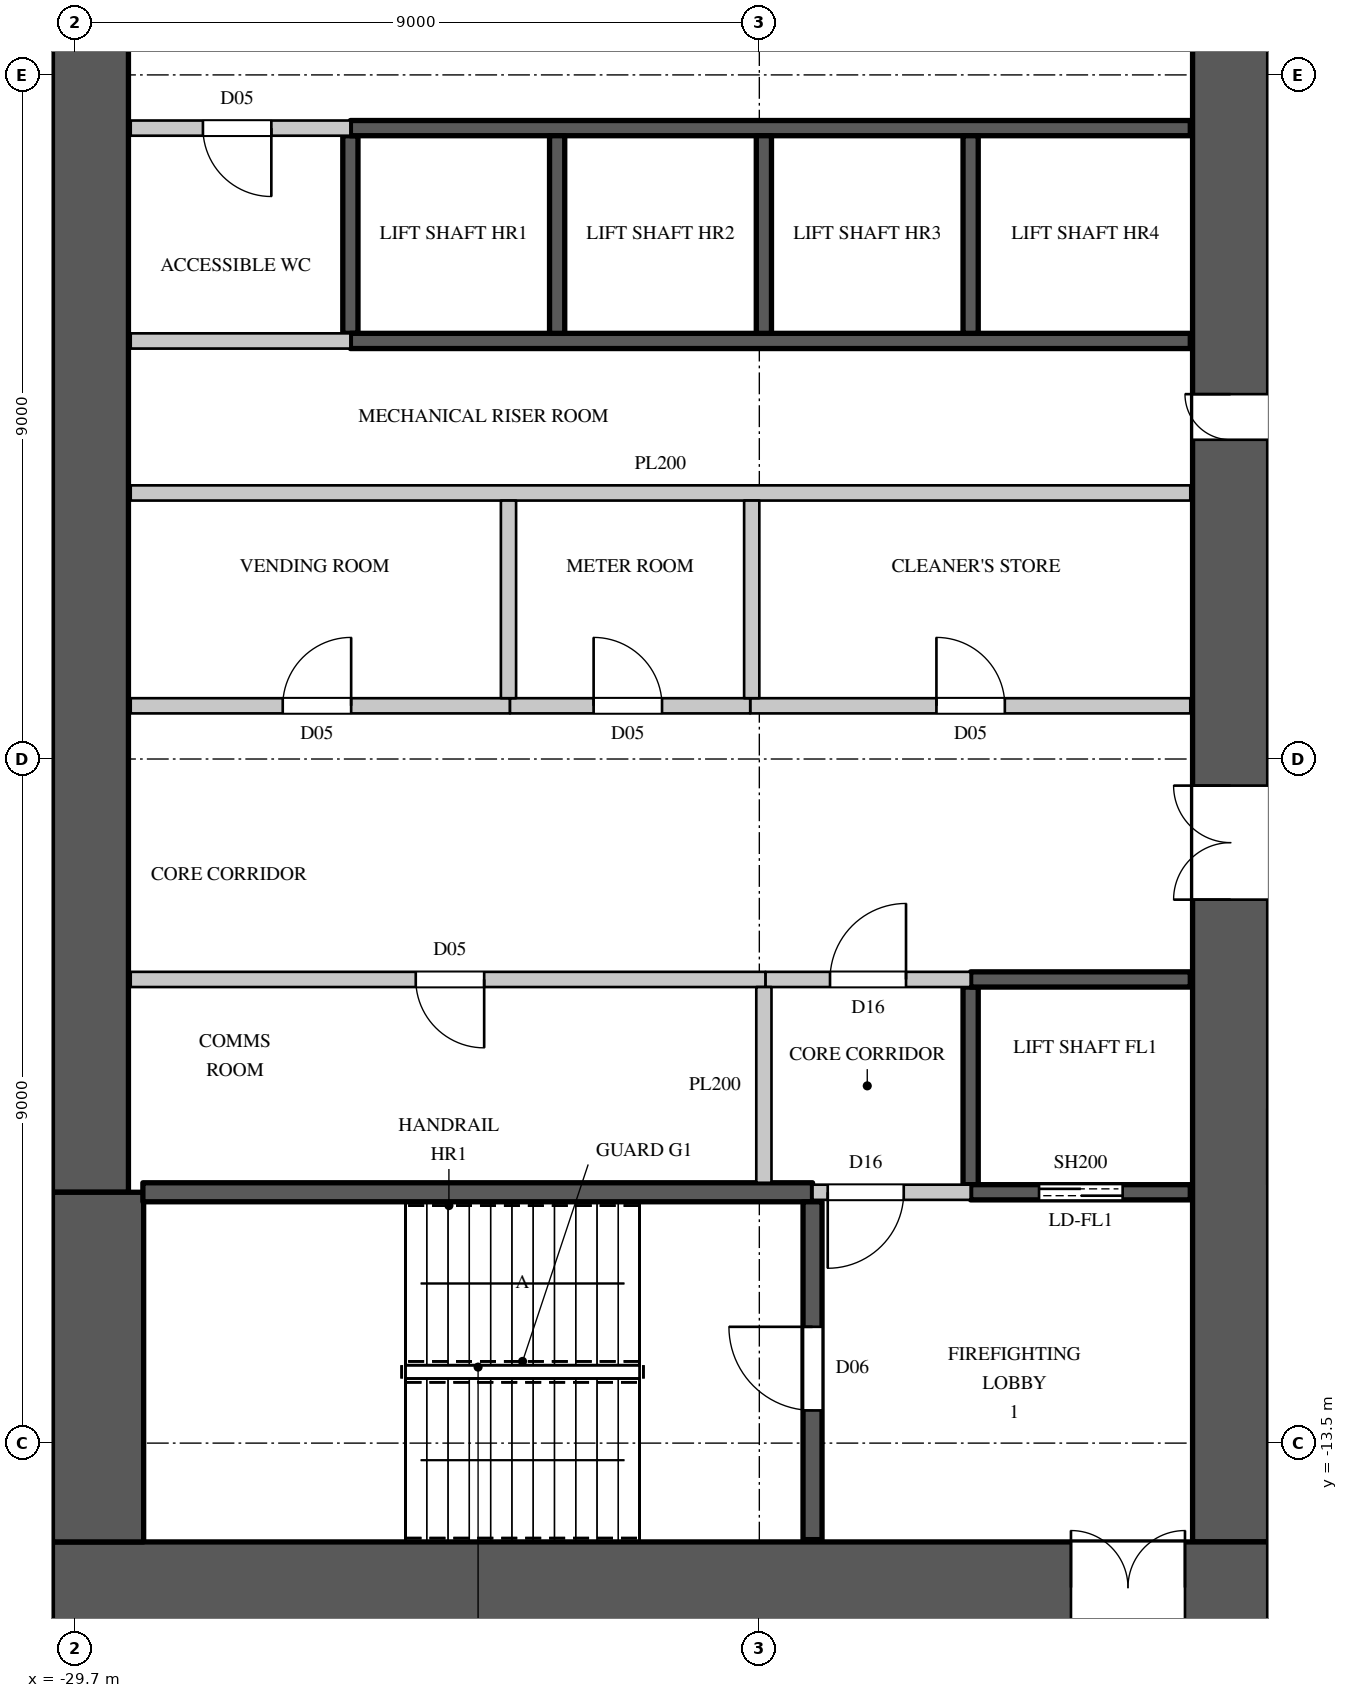
"""IFC4 building model, lengths in metres.
Left out: names, types, materials, properties, quantities, classifications, styles, units other than length and angle.
Written with IfcOpenShell. Run it as: python <this file> out.ifc"""

import sys

from ifc_helpers import new_model, si_unit, direction, frame, frame_2d, origin, place, context, subcontext, project, spatial, rectangle, extrude, element, fill, save


model = new_model("IFC4")
c1 = context("Model", 3, precision=1e-05, world=origin(), true_north=direction((0.0, 1.0)))
c2 = subcontext(c1, "Body", "Model", "MODEL_VIEW")
j1 = project(units=[si_unit("LENGTHUNIT", "METRE"), si_unit("PLANEANGLEUNIT", "RADIAN")], contexts=[c1])
p1 = place(None, origin())
s1 = spatial("IfcSite", under=j1, at=p1, CompositionType="ELEMENT")
p2 = place(p1, origin())
s2 = spatial("IfcBuilding", under=s1, at=p2, CompositionType="ELEMENT")
p3 = place(p2, frame((0.0, 0.0, 152.5)))
s3 = spatial("IfcBuildingStorey", under=s2, at=p3, CompositionType="ELEMENT", Elevation=152.5)
p4 = place(p3, frame((-30.0, -15.4, 0.0), z_axis=(0.0, 0.0, 1.0), x_axis=(1.0, 0.0, 0.0)))
e1 = element("IfcWall", 1, at=p4, inside=s3, PredefinedType="SHEAR", context=c2, shape_type="SweptSolid", body=[
    extrude(rectangle(XDim=16.0, YDim=1.2, at=frame_2d((8.0, 0.0))), origin(), (0.0, 0.0, 1.0), 8.0),
])
p5 = place(p4, frame((13.4, 0.0, 0.0)))
e2 = element("IfcOpeningElement", 2, at=p5, cuts=e1, PredefinedType="OPENING", context=c2, shape_type="SweptSolid", body=[
    extrude(rectangle(XDim=1.5, YDim=2.4, at=frame_2d((0.75, 1.2))), frame((0.0, 0.61, 0.0), z_axis=(0.0, -1.0, 0.0), x_axis=(1.0, 0.0, 0.0)), (0.0, 0.0, 1.0), 1.22),
])
p6 = place(p3, frame((-14.5, -14.8, 0.0), z_axis=(0.0, 0.0, 1.0), x_axis=(0.0, 1.0, 0.0)))
e3 = element("IfcWall", 3, at=p6, inside=s3, PredefinedType="SHEAR", context=c2, shape_type="SweptSolid", body=[
    extrude(rectangle(XDim=29.6, YDim=1.0, at=frame_2d((14.8, 0.0))), origin(), (0.0, 0.0, 1.0), 8.0),
])
p7 = place(p6, frame((8.45, 0.0, 0.0)))
e4 = element("IfcOpeningElement", 4, at=p7, cuts=e3, PredefinedType="OPENING", context=c2, shape_type="SweptSolid", body=[
    extrude(rectangle(XDim=1.5, YDim=2.4, at=frame_2d((0.75, 1.2))), frame((0.0, 0.51, 0.0), z_axis=(0.0, -1.0, 0.0), x_axis=(1.0, 0.0, 0.0)), (0.0, 0.0, 1.0), 1.02),
])
p8 = place(p6, frame((19.65, 0.0, 0.0)))
e5 = element("IfcOpeningElement", 5, at=p8, cuts=e3, PredefinedType="OPENING", context=c2, shape_type="SweptSolid", body=[
    extrude(rectangle(XDim=1.5, YDim=2.4, at=frame_2d((0.75, 1.2))), frame((0.0, 0.51, 0.0), z_axis=(0.0, -1.0, 0.0), x_axis=(1.0, 0.0, 0.0)), (0.0, 0.0, 1.0), 1.02),
])
p9 = place(p6, frame((14.5, 0.0, 0.0)))
e6 = element("IfcOpeningElement", 6, at=p9, cuts=e3, PredefinedType="OPENING", context=c2, shape_type="SweptSolid", body=[
    extrude(rectangle(XDim=0.6, YDim=2.0, at=frame_2d((0.3, 1.0))), frame((0.0, 0.51, 0.0), z_axis=(0.0, -1.0, 0.0), x_axis=(1.0, 0.0, 0.0)), (0.0, 0.0, 1.0), 1.02),
])
p10 = place(p3, frame((-29.5, -10.2, 0.0), z_axis=(0.0, 0.0, 1.0), x_axis=(0.0, 1.0, 0.0)))
e7 = element("IfcWall", 7, at=p10, inside=s3, PredefinedType="SHEAR", context=c2, shape_type="SweptSolid", body=[
    extrude(rectangle(XDim=20.4, YDim=1.0, at=frame_2d((10.2, 0.0))), origin(), (0.0, 0.0, 1.0), 8.0),
])
p11 = place(p3, frame((-29.4, -14.8, 0.0), z_axis=(0.0, 0.0, 1.0), x_axis=(0.0, 1.0, 0.0)))
e8 = element("IfcWall", 8, at=p11, inside=s3, PredefinedType="SHEAR", context=c2, shape_type="SweptSolid", body=[
    extrude(rectangle(XDim=4.6, YDim=1.2, at=frame_2d((2.3, 0.0))), origin(), (0.0, 0.0, 1.0), 8.0),
])
p12 = place(p3, frame((-28.97, -3.8, 0.0), z_axis=(0.0, 0.0, 1.0), x_axis=(1.0, 0.0, 0.0)))
e9 = element("IfcWall", 9, at=p12, inside=s3, PredefinedType="PARTITIONING", context=c2, shape_type="SweptSolid", body=[
    extrude(rectangle(XDim=4.99, YDim=0.2, at=frame_2d((2.495, 0.0))), origin(), (0.0, 0.0, 1.0), 7.7),
])
p13 = place(p12, frame((2.0, 0.0, 0.0)))
e10 = element("IfcOpeningElement", 10, at=p13, cuts=e9, PredefinedType="OPENING", context=c2, shape_type="SweptSolid", body=[
    extrude(rectangle(XDim=0.9, YDim=2.2, at=frame_2d((0.45, 1.1))), frame((0.0, 0.11, 0.0), z_axis=(0.0, -1.0, 0.0), x_axis=(1.0, 0.0, 0.0)), (0.0, 0.0, 1.0), 0.22),
])
p14 = place(p3, frame((-28.97, 3.8, 0.0), z_axis=(0.0, 0.0, 1.0), x_axis=(1.0, 0.0, 0.0)))
e11 = element("IfcWall", 11, at=p14, inside=s3, PredefinedType="PARTITIONING", context=c2, shape_type="SweptSolid", body=[
    extrude(rectangle(XDim=2.89, YDim=0.2, at=frame_2d((1.445, 0.0))), origin(), (0.0, 0.0, 1.0), 7.7),
])
p15 = place(p14, frame((0.95, 0.0, 0.0)))
e12 = element("IfcOpeningElement", 12, at=p15, cuts=e11, PredefinedType="OPENING", context=c2, shape_type="SweptSolid", body=[
    extrude(rectangle(XDim=0.9, YDim=2.2, at=frame_2d((0.45, 1.1))), frame((0.0, 0.11, 0.0), z_axis=(0.0, -1.0, 0.0), x_axis=(1.0, 0.0, 0.0)), (0.0, 0.0, 1.0), 0.22),
])
p16 = place(p3, frame((-20.82, -3.8, 0.0), z_axis=(0.0, 0.0, 1.0), x_axis=(1.0, 0.0, 0.0)))
e13 = element("IfcWall", 13, at=p16, inside=s3, PredefinedType="PARTITIONING", context=c2, shape_type="SweptSolid", body=[
    extrude(rectangle(XDim=5.79, YDim=0.2, at=frame_2d((2.895, 0.0))), origin(), (0.0, 0.0, 1.0), 7.7),
])
p17 = place(p16, frame((2.45, 0.0, 0.0)))
e14 = element("IfcOpeningElement", 14, at=p17, cuts=e13, PredefinedType="OPENING", context=c2, shape_type="SweptSolid", body=[
    extrude(rectangle(XDim=0.9, YDim=2.2, at=frame_2d((0.45, 1.1))), frame((0.0, 0.11, 0.0), z_axis=(0.0, -1.0, 0.0), x_axis=(1.0, 0.0, 0.0)), (0.0, 0.0, 1.0), 0.22),
])
p18 = place(p3, frame((-20.62, -7.4, 0.0), z_axis=(0.0, 0.0, 1.0), x_axis=(1.0, 0.0, 0.0)))
e15 = element("IfcWall", 15, at=p18, inside=s3, PredefinedType="PARTITIONING", context=c2, shape_type="SweptSolid", body=[
    extrude(rectangle(XDim=2.7, YDim=0.2, at=frame_2d((1.35, 0.0))), origin(), (0.0, 0.0, 1.0), 7.7),
])
p19 = place(p18, frame((0.85, 0.0, 0.0)))
e16 = element("IfcOpeningElement", 16, at=p19, cuts=e15, PredefinedType="OPENING", context=c2, shape_type="SweptSolid", body=[
    extrude(rectangle(XDim=1.0, YDim=2.2, at=frame_2d((0.5, 1.1))), frame((0.0, 0.11, 0.0), z_axis=(0.0, -1.0, 0.0), x_axis=(1.0, 0.0, 0.0)), (0.0, 0.0, 1.0), 0.22),
])
p20 = place(p3, frame((-20.0, -10.2, 0.0), z_axis=(0.0, 0.0, 1.0), x_axis=(1.0, 0.0, 0.0)))
e17 = element("IfcWall", 17, at=p20, inside=s3, PredefinedType="PARTITIONING", context=c2, shape_type="SweptSolid", body=[
    extrude(rectangle(XDim=2.08, YDim=0.2, at=frame_2d((1.04, 0.0))), origin(), (0.0, 0.0, 1.0), 7.7),
])
p21 = place(p20, frame((0.2, 0.0, 0.0)))
e18 = element("IfcOpeningElement", 18, at=p21, cuts=e17, PredefinedType="OPENING", context=c2, shape_type="SweptSolid", body=[
    extrude(rectangle(XDim=1.0, YDim=2.2, at=frame_2d((0.5, 1.1))), frame((0.0, 0.11, 0.0), z_axis=(0.0, -1.0, 0.0), x_axis=(1.0, 0.0, 0.0)), (0.0, 0.0, 1.0), 0.22),
])
p22 = place(p3, frame((-28.97, -7.4, 0.0), z_axis=(0.0, 0.0, 1.0), x_axis=(1.0, 0.0, 0.0)))
e19 = element("IfcWall", 19, at=p22, inside=s3, PredefinedType="PARTITIONING", context=c2, shape_type="SweptSolid", body=[
    extrude(rectangle(XDim=8.35, YDim=0.2, at=frame_2d((4.175, 0.0))), origin(), (0.0, 0.0, 1.0), 7.7),
])
p23 = place(p22, frame((3.75, 0.0, 0.0)))
e20 = element("IfcOpeningElement", 20, at=p23, cuts=e19, PredefinedType="OPENING", context=c2, shape_type="SweptSolid", body=[
    extrude(rectangle(XDim=0.9, YDim=2.2, at=frame_2d((0.45, 1.1))), frame((0.0, 0.11, 0.0), z_axis=(0.0, -1.0, 0.0), x_axis=(1.0, 0.0, 0.0)), (0.0, 0.0, 1.0), 0.22),
])
p24 = place(p3, frame((-28.97, -1.0, 0.0), z_axis=(0.0, 0.0, 1.0), x_axis=(1.0, 0.0, 0.0)))
e21 = element("IfcWall", 21, at=p24, inside=s3, PredefinedType="PARTITIONING", context=c2, shape_type="SweptSolid", body=[
    extrude(rectangle(XDim=13.94, YDim=0.2, at=frame_2d((6.97, 0.0))), origin(), (0.0, 0.0, 1.0), 7.7),
])
p25 = place(p3, frame((-28.97, 1.0, 0.0), z_axis=(0.0, 0.0, 1.0), x_axis=(1.0, 0.0, 0.0)))
e22 = element("IfcWall", 22, at=p25, inside=s3, PredefinedType="PARTITIONING", context=c2, shape_type="SweptSolid", body=[
    extrude(rectangle(XDim=2.89, YDim=0.2, at=frame_2d((1.445, 0.0))), origin(), (0.0, 0.0, 1.0), 7.7),
])
p26 = place(p3, frame((-23.98, -3.8, 0.0), z_axis=(0.0, 0.0, 1.0), x_axis=(1.0, 0.0, 0.0)))
e23 = element("IfcWall", 23, at=p26, inside=s3, PredefinedType="PARTITIONING", context=c2, shape_type="SweptSolid", body=[
    extrude(rectangle(XDim=3.16, YDim=0.2, at=frame_2d((1.58, 0.0))), origin(), (0.0, 0.0, 1.0), 7.7),
])
p27 = place(p26, frame((1.1, 0.0, 0.0)))
e24 = element("IfcOpeningElement", 24, at=p27, cuts=e23, PredefinedType="OPENING", context=c2, shape_type="SweptSolid", body=[
    extrude(rectangle(XDim=0.9, YDim=2.2, at=frame_2d((0.45, 1.1))), frame((0.0, 0.11, 0.0), z_axis=(0.0, -1.0, 0.0), x_axis=(1.0, 0.0, 0.0)), (0.0, 0.0, 1.0), 0.22),
])
for number, where, z_axis, x_axis in (
    (25, (-24.0, -3.7, 0.0), (0.0, 0.0, 1.0), (0.0, 1.0, 0.0)),
    (26, (-20.8, -3.7, 0.0), (0.0, 0.0, 1.0), (0.0, 1.0, 0.0)),
):
    element("IfcWall", number, at=place(p3, frame(where, z_axis=z_axis, x_axis=x_axis)), inside=s3, PredefinedType="PARTITIONING", context=c2, shape_type="SweptSolid", body=[
        extrude(rectangle(XDim=2.6, YDim=0.2, at=frame_2d((1.3, 0.0))), origin(), (0.0, 0.0, 1.0), 7.7),
    ])
p28 = place(p3, frame((-20.64, -10.075, 0.0), z_axis=(0.0, 0.0, 1.0), x_axis=(0.0, 1.0, 0.0)))
e27 = element("IfcWall", 27, at=p28, inside=s3, PredefinedType="PARTITIONING", context=c2, shape_type="SweptSolid", body=[
    extrude(rectangle(XDim=2.575, YDim=0.2, at=frame_2d((1.288, 0.0))), origin(), (0.0, 0.0, 1.0), 7.7),
])
p29 = place(p3, frame((-26.08, 1.1, 0.0), z_axis=(0.0, 0.0, 1.0), x_axis=(0.0, 1.0, 0.0)))
e28 = element("IfcWall", 28, at=p29, inside=s3, PredefinedType="SHEAR", context=c2, shape_type="SweptSolid", body=[
    extrude(rectangle(XDim=2.6, YDim=0.2, at=frame_2d((1.3, 0.0))), origin(), (0.0, 0.0, 1.0), 7.7),
])
for number, where, z_axis, x_axis in (
    (29, (-26.08, 1.0, 0.0), (0.0, 0.0, 1.0), (1.0, 0.0, 0.0)),
    (30, (-26.08, 3.8, 0.0), (0.0, 0.0, 1.0), (1.0, 0.0, 0.0)),
):
    element("IfcWall", number, at=place(p3, frame(where, z_axis=z_axis, x_axis=x_axis)), inside=s3, PredefinedType="SHEAR", context=c2, shape_type="SweptSolid", body=[
        extrude(rectangle(XDim=11.05, YDim=0.2, at=frame_2d((5.525, 0.0))), origin(), (0.0, 0.0, 1.0), 7.7),
    ])
for number, where, z_axis, x_axis in (
    (31, (-23.36, 1.1, 0.0), (0.0, 0.0, 1.0), (0.0, 1.0, 0.0)),
    (32, (-20.64, 1.1, 0.0), (0.0, 0.0, 1.0), (0.0, 1.0, 0.0)),
):
    element("IfcWall", number, at=place(p3, frame(where, z_axis=z_axis, x_axis=x_axis)), inside=s3, PredefinedType="SHEAR", context=c2, shape_type="SweptSolid", body=[
        extrude(rectangle(XDim=2.6, YDim=0.2, at=frame_2d((1.3, 0.0))), origin(), (0.0, 0.0, 1.0), 8.0),
    ])
p30 = place(p3, frame((-17.92, -10.1, 0.0), z_axis=(0.0, 0.0, 1.0), x_axis=(0.0, 1.0, 0.0)))
e33 = element("IfcWall", 33, at=p30, inside=s3, PredefinedType="SHEAR", context=c2, shape_type="SweptSolid", body=[
    extrude(rectangle(XDim=2.6, YDim=0.2, at=frame_2d((1.3, 0.0))), origin(), (0.0, 0.0, 1.0), 7.7),
])
p31 = place(p3, frame((-17.92, -10.2, 0.0), z_axis=(0.0, 0.0, 1.0), x_axis=(1.0, 0.0, 0.0)))
e34 = element("IfcWall", 34, at=p31, inside=s3, PredefinedType="SHEAR", context=c2, shape_type="SweptSolid", body=[
    extrude(rectangle(XDim=2.89, YDim=0.2, at=frame_2d((1.445, 0.0))), origin(), (0.0, 0.0, 1.0), 7.7),
])
p32 = place(p31, frame((0.9, 0.0, 0.0)))
e35 = element("IfcOpeningElement", 35, at=p32, cuts=e34, PredefinedType="OPENING", context=c2, shape_type="SweptSolid", body=[
    extrude(rectangle(XDim=1.1, YDim=2.2, at=frame_2d((0.55, 1.1))), frame((0.0, 0.11, 0.0), z_axis=(0.0, -1.0, 0.0), x_axis=(1.0, 0.0, 0.0)), (0.0, 0.0, 1.0), 0.22),
])
p33 = place(p3, frame((-17.92, -7.4, 0.0), z_axis=(0.0, 0.0, 1.0), x_axis=(1.0, 0.0, 0.0)))
e36 = element("IfcWall", 36, at=p33, inside=s3, PredefinedType="SHEAR", context=c2, shape_type="SweptSolid", body=[
    extrude(rectangle(XDim=2.89, YDim=0.2, at=frame_2d((1.445, 0.0))), origin(), (0.0, 0.0, 1.0), 7.7),
])
p34 = place(p3, frame((-17.92, 1.1, 0.0), z_axis=(0.0, 0.0, 1.0), x_axis=(0.0, 1.0, 0.0)))
e37 = element("IfcWall", 37, at=p34, inside=s3, PredefinedType="SHEAR", context=c2, shape_type="SweptSolid", body=[
    extrude(rectangle(XDim=2.6, YDim=0.2, at=frame_2d((1.3, 0.0))), origin(), (0.0, 0.0, 1.0), 8.0),
])
p35 = place(p3, frame((-28.81, -10.2, 0.0), z_axis=(0.0, 0.0, 1.0), x_axis=(1.0, 0.0, 0.0)))
e38 = element("IfcWall", 38, at=p35, inside=s3, PredefinedType="SHEAR", context=c2, shape_type="SweptSolid", body=[
    extrude(rectangle(XDim=8.81, YDim=0.25, at=frame_2d((4.405, 0.0))), origin(), (0.0, 0.0, 1.0), 7.7),
])
p36 = place(p3, frame((-20.0, -14.77, 0.0), z_axis=(0.0, 0.0, 1.0), x_axis=(0.0, 1.0, 0.0)))
e39 = element("IfcWall", 39, at=p36, inside=s3, PredefinedType="SHEAR", context=c2, shape_type="SweptSolid", body=[
    extrude(rectangle(XDim=4.445, YDim=0.25, at=frame_2d((2.223, 0.0))), origin(), (0.0, 0.0, 1.0), 7.7),
])
p37 = place(p36, frame((1.7, 0.0, 0.0)))
e40 = element("IfcOpeningElement", 40, at=p37, cuts=e39, PredefinedType="OPENING", context=c2, shape_type="SweptSolid", body=[
    extrude(rectangle(XDim=1.1, YDim=2.2, at=frame_2d((0.55, 1.1))), frame((0.0, 0.135, 0.0), z_axis=(0.0, -1.0, 0.0), x_axis=(1.0, 0.0, 0.0)), (0.0, 0.0, 1.0), 0.27),
])
p38 = place(p37, origin())
e41 = element("IfcDoor", 41, at=p38, inside=s3, OperationType="SINGLE_SWING_RIGHT", PredefinedType="DOOR", context=c2, shape_type="SweptSolid", body=[
    extrude(rectangle(XDim=1.1, YDim=2.2, at=frame_2d((0.55, 1.1))), frame((0.0, 0.025, 0.0), z_axis=(0.0, -1.0, 0.0), x_axis=(1.0, 0.0, 0.0)), (0.0, 0.0, 1.0), 0.05),
])
fill(e40, e41)
p39 = place(p19, origin())
e42 = element("IfcDoor", 42, at=p39, inside=s3, OperationType="SINGLE_SWING_RIGHT", PredefinedType="DOOR", context=c2, shape_type="SweptSolid", body=[
    extrude(rectangle(XDim=1.0, YDim=2.2, at=frame_2d((0.5, 1.1))), frame((0.0, 0.025, 0.0), z_axis=(0.0, -1.0, 0.0), x_axis=(1.0, 0.0, 0.0)), (0.0, 0.0, 1.0), 0.05),
])
fill(e16, e42)
p40 = place(p21, origin())
e43 = element("IfcDoor", 43, at=p40, inside=s3, OperationType="SINGLE_SWING_RIGHT", PredefinedType="DOOR", context=c2, shape_type="SweptSolid", body=[
    extrude(rectangle(XDim=1.0, YDim=2.2, at=frame_2d((0.5, 1.1))), frame((0.0, 0.025, 0.0), z_axis=(0.0, -1.0, 0.0), x_axis=(1.0, 0.0, 0.0)), (0.0, 0.0, 1.0), 0.05),
])
fill(e18, e43)
p41 = place(p23, origin())
e44 = element("IfcDoor", 44, at=p41, inside=s3, OperationType="SINGLE_SWING_LEFT", PredefinedType="DOOR", context=c2, shape_type="SweptSolid", body=[
    extrude(rectangle(XDim=0.9, YDim=2.2, at=frame_2d((0.45, 1.1))), frame((0.0, 0.025, 0.0), z_axis=(0.0, -1.0, 0.0), x_axis=(1.0, 0.0, 0.0)), (0.0, 0.0, 1.0), 0.05),
])
fill(e20, e44)
p42 = place(p13, origin())
e45 = element("IfcDoor", 45, at=p42, inside=s3, OperationType="SINGLE_SWING_RIGHT", PredefinedType="DOOR", context=c2, shape_type="SweptSolid", body=[
    extrude(rectangle(XDim=0.9, YDim=2.2, at=frame_2d((0.45, 1.1))), frame((0.0, 0.025, 0.0), z_axis=(0.0, -1.0, 0.0), x_axis=(1.0, 0.0, 0.0)), (0.0, 0.0, 1.0), 0.05),
])
fill(e10, e45)
p43 = place(p27, origin())
e46 = element("IfcDoor", 46, at=p43, inside=s3, OperationType="SINGLE_SWING_LEFT", PredefinedType="DOOR", context=c2, shape_type="SweptSolid", body=[
    extrude(rectangle(XDim=0.9, YDim=2.2, at=frame_2d((0.45, 1.1))), frame((0.0, 0.025, 0.0), z_axis=(0.0, -1.0, 0.0), x_axis=(1.0, 0.0, 0.0)), (0.0, 0.0, 1.0), 0.05),
])
fill(e24, e46)
p44 = place(p17, origin())
e47 = element("IfcDoor", 47, at=p44, inside=s3, OperationType="SINGLE_SWING_LEFT", PredefinedType="DOOR", context=c2, shape_type="SweptSolid", body=[
    extrude(rectangle(XDim=0.9, YDim=2.2, at=frame_2d((0.45, 1.1))), frame((0.0, 0.025, 0.0), z_axis=(0.0, -1.0, 0.0), x_axis=(1.0, 0.0, 0.0)), (0.0, 0.0, 1.0), 0.05),
])
fill(e14, e47)
p45 = place(p15, origin())
e48 = element("IfcDoor", 48, at=p45, inside=s3, OperationType="SINGLE_SWING_LEFT", PredefinedType="DOOR", context=c2, shape_type="SweptSolid", body=[
    extrude(rectangle(XDim=0.9, YDim=2.2, at=frame_2d((0.45, 1.1))), frame((0.0, 0.025, 0.0), z_axis=(0.0, -1.0, 0.0), x_axis=(1.0, 0.0, 0.0)), (0.0, 0.0, 1.0), 0.05),
])
fill(e12, e48)
p46 = place(p32, origin())
e49 = element("IfcDoor", 49, at=p46, inside=s3, OperationType="DOUBLE_DOOR_SLIDING", PredefinedType="DOOR", context=c2, shape_type="SweptSolid", body=[
    extrude(rectangle(XDim=1.1, YDim=2.2, at=frame_2d((0.55, 1.1))), frame((0.0, 0.025, 0.0), z_axis=(0.0, -1.0, 0.0), x_axis=(1.0, 0.0, 0.0)), (0.0, 0.0, 1.0), 0.05),
])
fill(e35, e49)
p47 = place(p5, origin())
e50 = element("IfcDoor", 50, at=p47, inside=s3, OperationType="DOUBLE_DOOR_SINGLE_SWING", PredefinedType="DOOR", context=c2, shape_type="SweptSolid", body=[
    extrude(rectangle(XDim=1.5, YDim=2.4, at=frame_2d((0.75, 1.2))), frame((0.0, 0.025, 0.0), z_axis=(0.0, -1.0, 0.0), x_axis=(1.0, 0.0, 0.0)), (0.0, 0.0, 1.0), 0.05),
])
fill(e2, e50)
p48 = place(p7, origin())
e51 = element("IfcDoor", 51, at=p48, inside=s3, OperationType="DOUBLE_DOOR_SINGLE_SWING", PredefinedType="DOOR", context=c2, shape_type="SweptSolid", body=[
    extrude(rectangle(XDim=1.5, YDim=2.4, at=frame_2d((0.75, 1.2))), frame((0.0, 0.495, 0.0), z_axis=(0.0, -1.0, 0.0), x_axis=(1.0, 0.0, 0.0)), (0.0, 0.0, 1.0), 0.05),
])
fill(e4, e51)
p49 = place(p9, origin())
e52 = element("IfcDoor", 52, at=p49, inside=s3, OperationType="SINGLE_SWING_RIGHT", PredefinedType="DOOR", context=c2, shape_type="SweptSolid", body=[
    extrude(rectangle(XDim=0.6, YDim=2.0, at=frame_2d((0.3, 1.0))), frame((0.0, 0.495, 0.0), z_axis=(0.0, -1.0, 0.0), x_axis=(1.0, 0.0, 0.0)), (0.0, 0.0, 1.0), 0.05),
])
fill(e6, e52)
save(model, sys.argv[1])
